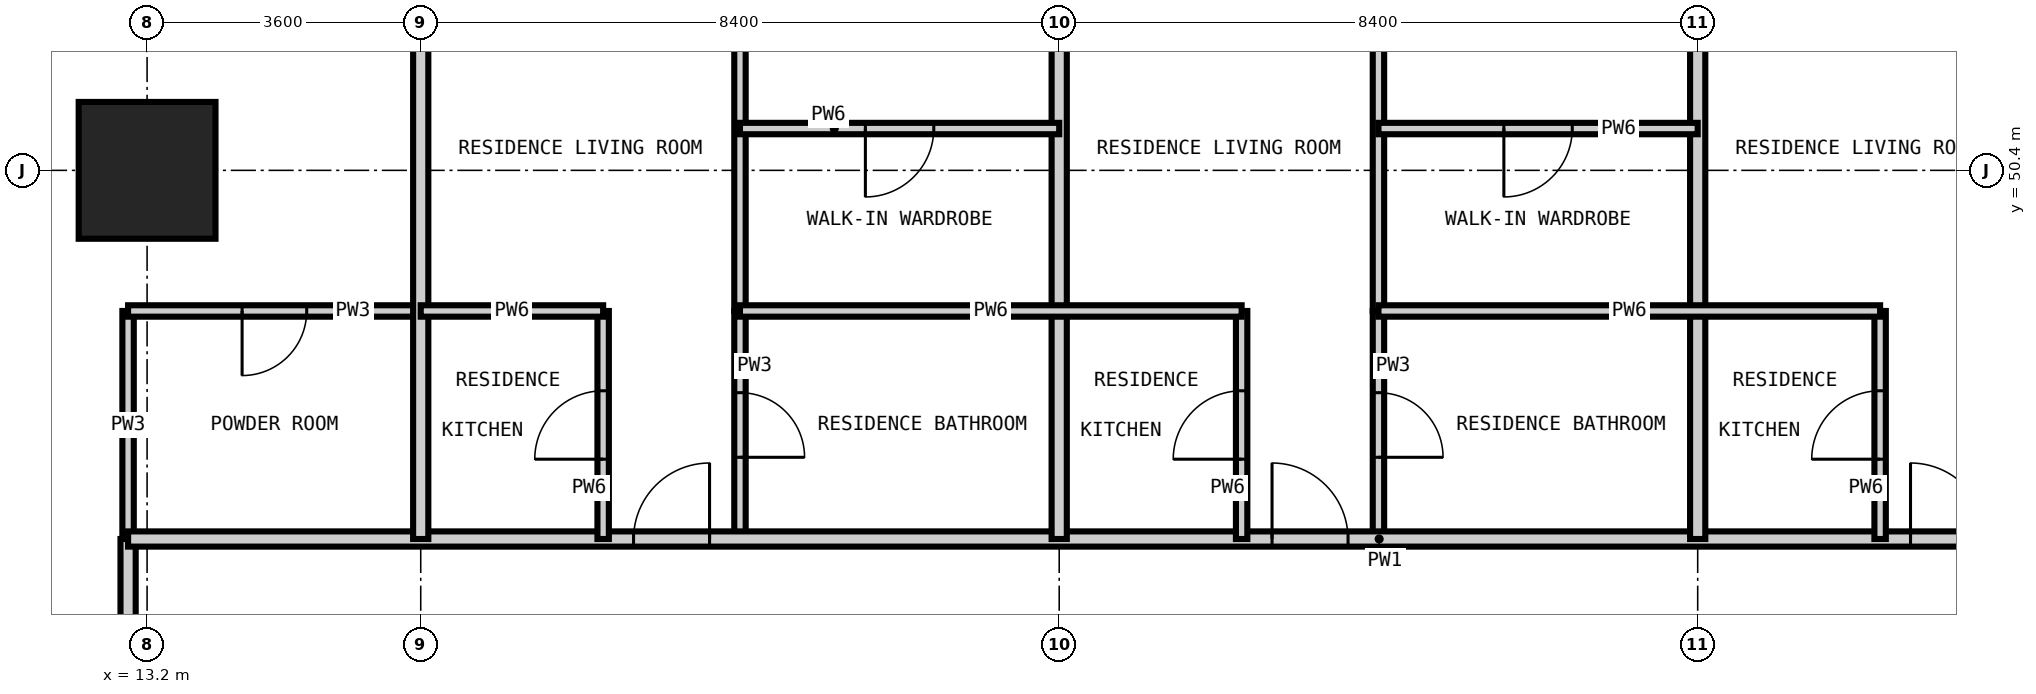
"""IFC4 building model, lengths in metres.
Left out: names, types, materials, properties, quantities, classifications, styles, units other than length and angle.
Written with IfcOpenShell. Run it as: python <this file> out.ifc"""

import sys

from ifc_helpers import new_model, si_unit, direction, frame, frame_2d, origin, origin_2d, place, context, subcontext, project, spatial, rectangle, extrude, element, fill, save


model = new_model("IFC4")
c1 = context("Model", 3, precision=1e-05, world=origin(), true_north=direction((0.0, 1.0)))
c2 = subcontext(c1, "Body", "Model", "MODEL_VIEW")
j1 = project(units=[si_unit("LENGTHUNIT", "METRE"), si_unit("PLANEANGLEUNIT", "RADIAN")], contexts=[c1])
p1 = place(None, origin())
s1 = spatial("IfcSite", under=j1, at=p1, CompositionType="ELEMENT")
p2 = place(p1, origin())
s2 = spatial("IfcBuilding", under=s1, at=p2, CompositionType="ELEMENT")
p3 = place(p2, frame((0.0, 0.0, 45.0)))
s3 = spatial("IfcBuildingStorey", under=s2, at=p3, CompositionType="ELEMENT", Elevation=45.0)
p4 = place(p3, frame((13.2, 50.4, -0.35), z_axis=(0.0, 0.0, 1.0), x_axis=(1.0, 0.0, 0.0)))
e1 = element("IfcColumn", 1, at=p4, inside=s3, PredefinedType="COLUMN", context=c2, shape_type="SweptSolid", body=[
    extrude(rectangle(XDim=1.8, YDim=1.8, at=origin_2d()), origin(), (0.0, 0.0, 1.0), 3.6),
])
p5 = place(p3, frame((12.95, 45.55, 0.0), z_axis=(0.0, 0.0, 1.0), x_axis=(0.0, 1.0, 0.0)))
e2 = element("IfcWall", 2, at=p5, inside=s3, PredefinedType="PARTITIONING", context=c2, shape_type="SweptSolid", body=[
    extrude(rectangle(XDim=3.0, YDim=0.15, at=frame_2d((1.5, 0.0))), origin(), (0.0, 0.0, 1.0), 3.25),
])
p6 = place(p3, frame((21.0, 45.55, 0.0), z_axis=(0.0, 0.0, 1.0), x_axis=(0.0, 1.0, 0.0)))
e3 = element("IfcWall", 3, at=p6, inside=s3, PredefinedType="PARTITIONING", context=c2, shape_type="SweptSolid", body=[
    extrude(rectangle(XDim=3.0, YDim=0.15, at=frame_2d((1.5, 0.0))), origin(), (0.0, 0.0, 1.0), 3.25),
])
p7 = place(p6, frame((1.075, 0.0, 0.0)))
e4 = element("IfcOpeningElement", 4, at=p7, cuts=e3, PredefinedType="OPENING", context=c2, shape_type="SweptSolid", body=[
    extrude(rectangle(XDim=0.85, YDim=2.1, at=frame_2d((0.425, 1.05))), frame((0.0, 0.085, 0.0), z_axis=(0.0, -1.0, 0.0), x_axis=(1.0, 0.0, 0.0)), (0.0, 0.0, 1.0), 0.17),
])
p8 = place(p3, frame((29.4, 45.55, 0.0), z_axis=(0.0, 0.0, 1.0), x_axis=(0.0, 1.0, 0.0)))
e5 = element("IfcWall", 5, at=p8, inside=s3, PredefinedType="PARTITIONING", context=c2, shape_type="SweptSolid", body=[
    extrude(rectangle(XDim=3.0, YDim=0.15, at=frame_2d((1.5, 0.0))), origin(), (0.0, 0.0, 1.0), 3.25),
])
p9 = place(p8, frame((1.075, 0.0, 0.0)))
e6 = element("IfcOpeningElement", 6, at=p9, cuts=e5, PredefinedType="OPENING", context=c2, shape_type="SweptSolid", body=[
    extrude(rectangle(XDim=0.85, YDim=2.1, at=frame_2d((0.425, 1.05))), frame((0.0, 0.085, 0.0), z_axis=(0.0, -1.0, 0.0), x_axis=(1.0, 0.0, 0.0)), (0.0, 0.0, 1.0), 0.17),
])
p10 = place(p3, frame((12.95, 48.55, 0.0), z_axis=(0.0, 0.0, 1.0), x_axis=(1.0, 0.0, 0.0)))
e7 = element("IfcWall", 7, at=p10, inside=s3, PredefinedType="PARTITIONING", context=c2, shape_type="SweptSolid", body=[
    extrude(rectangle(XDim=3.85, YDim=0.15, at=frame_2d((1.925, 0.0))), origin(), (0.0, 0.0, 1.0), 3.25),
])
p11 = place(p10, frame((1.5, 0.0, 0.0)))
e8 = element("IfcOpeningElement", 8, at=p11, cuts=e7, PredefinedType="OPENING", context=c2, shape_type="SweptSolid", body=[
    extrude(rectangle(XDim=0.85, YDim=2.1, at=frame_2d((0.425, 1.05))), frame((0.0, 0.085, 0.0), z_axis=(0.0, -1.0, 0.0), x_axis=(1.0, 0.0, 0.0)), (0.0, 0.0, 1.0), 0.17),
])
p12 = place(p3, frame((12.95, 12.95, 0.0), z_axis=(0.0, 0.0, 1.0), x_axis=(0.0, 1.0, 0.0)))
e9 = element("IfcWall", 9, at=p12, inside=s3, PredefinedType="PARTITIONING", context=c2, shape_type="SweptSolid", body=[
    extrude(rectangle(XDim=32.6, YDim=0.2, at=frame_2d((16.3, 0.0))), origin(), (0.0, 0.0, 1.0), 3.25),
])
p13 = place(p12, frame((8.45, 0.0, 0.0)))
e10 = element("IfcOpeningElement", 10, at=p13, cuts=e9, PredefinedType="OPENING", context=c2, shape_type="SweptSolid", body=[
    extrude(rectangle(XDim=1.0, YDim=2.2, at=frame_2d((0.5, 1.1))), frame((0.0, 0.11, 0.0), z_axis=(0.0, -1.0, 0.0), x_axis=(1.0, 0.0, 0.0)), (0.0, 0.0, 1.0), 0.22),
])
p14 = place(p12, frame((16.7, 0.0, 0.0)))
e11 = element("IfcOpeningElement", 11, at=p14, cuts=e9, PredefinedType="OPENING", context=c2, shape_type="SweptSolid", body=[
    extrude(rectangle(XDim=1.0, YDim=2.2, at=frame_2d((0.5, 1.1))), frame((0.0, 0.11, 0.0), z_axis=(0.0, -1.0, 0.0), x_axis=(1.0, 0.0, 0.0)), (0.0, 0.0, 1.0), 0.22),
])
p15 = place(p12, frame((23.6, 0.0, 0.0)))
e12 = element("IfcOpeningElement", 12, at=p15, cuts=e9, PredefinedType="OPENING", context=c2, shape_type="SweptSolid", body=[
    extrude(rectangle(XDim=1.0, YDim=2.2, at=frame_2d((0.5, 1.1))), frame((0.0, 0.11, 0.0), z_axis=(0.0, -1.0, 0.0), x_axis=(1.0, 0.0, 0.0)), (0.0, 0.0, 1.0), 0.22),
])
p16 = place(p12, frame((25.1, 0.0, 0.0)))
e13 = element("IfcOpeningElement", 13, at=p16, cuts=e9, PredefinedType="OPENING", context=c2, shape_type="SweptSolid", body=[
    extrude(rectangle(XDim=1.0, YDim=2.2, at=frame_2d((0.5, 1.1))), frame((0.0, 0.11, 0.0), z_axis=(0.0, -1.0, 0.0), x_axis=(1.0, 0.0, 0.0)), (0.0, 0.0, 1.0), 0.22),
])
p17 = place(p12, frame((1.425, 0.0, 0.0)))
e14 = element("IfcOpeningElement", 14, at=p17, cuts=e9, PredefinedType="OPENING", context=c2, shape_type="SweptSolid", body=[
    extrude(rectangle(XDim=1.0, YDim=2.2, at=frame_2d((0.5, 1.1))), frame((0.0, 0.11, 0.0), z_axis=(0.0, -1.0, 0.0), x_axis=(1.0, 0.0, 0.0)), (0.0, 0.0, 1.0), 0.22),
])
p18 = place(p12, frame((30.325, 0.0, 0.0)))
e15 = element("IfcOpeningElement", 15, at=p18, cuts=e9, PredefinedType="OPENING", context=c2, shape_type="SweptSolid", body=[
    extrude(rectangle(XDim=1.0, YDim=2.2, at=frame_2d((0.5, 1.1))), frame((0.0, 0.11, 0.0), z_axis=(0.0, -1.0, 0.0), x_axis=(1.0, 0.0, 0.0)), (0.0, 0.0, 1.0), 0.22),
])
p19 = place(p3, frame((12.95, 45.55, 0.0), z_axis=(0.0, 0.0, 1.0), x_axis=(1.0, 0.0, 0.0)))
e16 = element("IfcWall", 16, at=p19, inside=s3, PredefinedType="PARTITIONING", context=c2, shape_type="SweptSolid", body=[
    extrude(rectangle(XDim=32.3, YDim=0.2, at=frame_2d((16.15, 0.0))), origin(), (0.0, 0.0, 1.0), 3.25),
])
p20 = place(p19, frame((6.65, 0.0, 0.0)))
e17 = element("IfcOpeningElement", 17, at=p20, cuts=e16, PredefinedType="OPENING", context=c2, shape_type="SweptSolid", body=[
    extrude(rectangle(XDim=1.0, YDim=2.2, at=frame_2d((0.5, 1.1))), frame((0.0, 0.11, 0.0), z_axis=(0.0, -1.0, 0.0), x_axis=(1.0, 0.0, 0.0)), (0.0, 0.0, 1.0), 0.22),
])
p21 = place(p19, frame((15.05, 0.0, 0.0)))
e18 = element("IfcOpeningElement", 18, at=p21, cuts=e16, PredefinedType="OPENING", context=c2, shape_type="SweptSolid", body=[
    extrude(rectangle(XDim=1.0, YDim=2.2, at=frame_2d((0.5, 1.1))), frame((0.0, 0.11, 0.0), z_axis=(0.0, -1.0, 0.0), x_axis=(1.0, 0.0, 0.0)), (0.0, 0.0, 1.0), 0.22),
])
p22 = place(p19, frame((23.45, 0.0, 0.0)))
e19 = element("IfcOpeningElement", 19, at=p22, cuts=e16, PredefinedType="OPENING", context=c2, shape_type="SweptSolid", body=[
    extrude(rectangle(XDim=1.0, YDim=2.2, at=frame_2d((0.5, 1.1))), frame((0.0, 0.11, 0.0), z_axis=(0.0, -1.0, 0.0), x_axis=(1.0, 0.0, 0.0)), (0.0, 0.0, 1.0), 0.22),
])
for number, where, z_axis, x_axis in (
    (20, (16.8, 45.55, 0.0), (0.0, 0.0, 1.0), (0.0, 1.0, 0.0)),
    (21, (25.2, 45.55, 0.0), (0.0, 0.0, 1.0), (0.0, 1.0, 0.0)),
    (22, (33.6, 45.55, 0.0), (0.0, 0.0, 1.0), (0.0, 1.0, 0.0)),
):
    element("IfcWall", number, at=place(p3, frame(where, z_axis=z_axis, x_axis=x_axis)), inside=s3, PredefinedType="PARTITIONING", context=c2, shape_type="SweptSolid", body=[
        extrude(rectangle(XDim=13.258, YDim=0.2, at=frame_2d((6.629, 0.0))), origin(), (0.0, 0.0, 1.0), 3.25),
    ])
p23 = place(p3, frame((19.2, 45.55, 0.0), z_axis=(0.0, 0.0, 1.0), x_axis=(0.0, 1.0, 0.0)))
e23 = element("IfcWall", 23, at=p23, inside=s3, PredefinedType="PARTITIONING", context=c2, shape_type="SweptSolid", body=[
    extrude(rectangle(XDim=3.0, YDim=0.15, at=frame_2d((1.5, 0.0))), origin(), (0.0, 0.0, 1.0), 3.25),
])
p24 = place(p23, frame((1.05, 0.0, 0.0)))
e24 = element("IfcOpeningElement", 24, at=p24, cuts=e23, PredefinedType="OPENING", context=c2, shape_type="SweptSolid", body=[
    extrude(rectangle(XDim=0.9, YDim=2.1, at=frame_2d((0.45, 1.05))), frame((0.0, 0.085, 0.0), z_axis=(0.0, -1.0, 0.0), x_axis=(1.0, 0.0, 0.0)), (0.0, 0.0, 1.0), 0.17),
])
p25 = place(p3, frame((21.0, 48.55, 0.0), z_axis=(0.0, 0.0, 1.0), x_axis=(0.0, 1.0, 0.0)))
e25 = element("IfcWall", 25, at=p25, inside=s3, PredefinedType="PARTITIONING", context=c2, shape_type="SweptSolid", body=[
    extrude(rectangle(XDim=10.258, YDim=0.15, at=frame_2d((5.129, 0.0))), origin(), (0.0, 0.0, 1.0), 3.25),
])
p26 = place(p25, frame((5.875, 0.0, 0.0)))
e26 = element("IfcOpeningElement", 26, at=p26, cuts=e25, PredefinedType="OPENING", context=c2, shape_type="SweptSolid", body=[
    extrude(rectangle(XDim=0.9, YDim=2.1, at=frame_2d((0.45, 1.05))), frame((0.0, 0.085, 0.0), z_axis=(0.0, -1.0, 0.0), x_axis=(1.0, 0.0, 0.0)), (0.0, 0.0, 1.0), 0.17),
])
p27 = place(p3, frame((27.6, 45.55, 0.0), z_axis=(0.0, 0.0, 1.0), x_axis=(0.0, 1.0, 0.0)))
e27 = element("IfcWall", 27, at=p27, inside=s3, PredefinedType="PARTITIONING", context=c2, shape_type="SweptSolid", body=[
    extrude(rectangle(XDim=3.0, YDim=0.15, at=frame_2d((1.5, 0.0))), origin(), (0.0, 0.0, 1.0), 3.25),
])
p28 = place(p27, frame((1.05, 0.0, 0.0)))
e28 = element("IfcOpeningElement", 28, at=p28, cuts=e27, PredefinedType="OPENING", context=c2, shape_type="SweptSolid", body=[
    extrude(rectangle(XDim=0.9, YDim=2.1, at=frame_2d((0.45, 1.05))), frame((0.0, 0.085, 0.0), z_axis=(0.0, -1.0, 0.0), x_axis=(1.0, 0.0, 0.0)), (0.0, 0.0, 1.0), 0.17),
])
p29 = place(p3, frame((29.4, 48.55, 0.0), z_axis=(0.0, 0.0, 1.0), x_axis=(0.0, 1.0, 0.0)))
e29 = element("IfcWall", 29, at=p29, inside=s3, PredefinedType="PARTITIONING", context=c2, shape_type="SweptSolid", body=[
    extrude(rectangle(XDim=10.258, YDim=0.15, at=frame_2d((5.129, 0.0))), origin(), (0.0, 0.0, 1.0), 3.25),
])
p30 = place(p29, frame((5.875, 0.0, 0.0)))
e30 = element("IfcOpeningElement", 30, at=p30, cuts=e29, PredefinedType="OPENING", context=c2, shape_type="SweptSolid", body=[
    extrude(rectangle(XDim=0.9, YDim=2.1, at=frame_2d((0.45, 1.05))), frame((0.0, 0.085, 0.0), z_axis=(0.0, -1.0, 0.0), x_axis=(1.0, 0.0, 0.0)), (0.0, 0.0, 1.0), 0.17),
])
p31 = place(p3, frame((36.0, 45.55, 0.0), z_axis=(0.0, 0.0, 1.0), x_axis=(0.0, 1.0, 0.0)))
e31 = element("IfcWall", 31, at=p31, inside=s3, PredefinedType="PARTITIONING", context=c2, shape_type="SweptSolid", body=[
    extrude(rectangle(XDim=3.0, YDim=0.15, at=frame_2d((1.5, 0.0))), origin(), (0.0, 0.0, 1.0), 3.25),
])
p32 = place(p31, frame((1.05, 0.0, 0.0)))
e32 = element("IfcOpeningElement", 32, at=p32, cuts=e31, PredefinedType="OPENING", context=c2, shape_type="SweptSolid", body=[
    extrude(rectangle(XDim=0.9, YDim=2.1, at=frame_2d((0.45, 1.05))), frame((0.0, 0.085, 0.0), z_axis=(0.0, -1.0, 0.0), x_axis=(1.0, 0.0, 0.0)), (0.0, 0.0, 1.0), 0.17),
])
p33 = place(p3, frame((16.8, 48.55, 0.0), z_axis=(0.0, 0.0, 1.0), x_axis=(1.0, 0.0, 0.0)))
e33 = element("IfcWall", 33, at=p33, inside=s3, PredefinedType="PARTITIONING", context=c2, shape_type="SweptSolid", body=[
    extrude(rectangle(XDim=2.4, YDim=0.15, at=frame_2d((1.2, 0.0))), origin(), (0.0, 0.0, 1.0), 3.25),
])
for number, where, z_axis, x_axis in (
    (34, (21.0, 48.55, 0.0), (0.0, 0.0, 1.0), (1.0, 0.0, 0.0)),
    (35, (29.4, 48.55, 0.0), (0.0, 0.0, 1.0), (1.0, 0.0, 0.0)),
):
    element("IfcWall", number, at=place(p3, frame(where, z_axis=z_axis, x_axis=x_axis)), inside=s3, PredefinedType="PARTITIONING", context=c2, shape_type="SweptSolid", body=[
        extrude(rectangle(XDim=6.6, YDim=0.15, at=frame_2d((3.3, 0.0))), origin(), (0.0, 0.0, 1.0), 3.25),
    ])
p34 = place(p3, frame((21.0, 50.95, 0.0), z_axis=(0.0, 0.0, 1.0), x_axis=(1.0, 0.0, 0.0)))
e36 = element("IfcWall", 36, at=p34, inside=s3, PredefinedType="PARTITIONING", context=c2, shape_type="SweptSolid", body=[
    extrude(rectangle(XDim=4.2, YDim=0.15, at=frame_2d((2.1, 0.0))), origin(), (0.0, 0.0, 1.0), 3.25),
])
p35 = place(p34, frame((1.65, 0.0, 0.0)))
e37 = element("IfcOpeningElement", 37, at=p35, cuts=e36, PredefinedType="OPENING", context=c2, shape_type="SweptSolid", body=[
    extrude(rectangle(XDim=0.9, YDim=2.1, at=frame_2d((0.45, 1.05))), frame((0.0, 0.085, 0.0), z_axis=(0.0, -1.0, 0.0), x_axis=(1.0, 0.0, 0.0)), (0.0, 0.0, 1.0), 0.17),
])
p36 = place(p3, frame((29.4, 50.95, 0.0), z_axis=(0.0, 0.0, 1.0), x_axis=(1.0, 0.0, 0.0)))
e38 = element("IfcWall", 38, at=p36, inside=s3, PredefinedType="PARTITIONING", context=c2, shape_type="SweptSolid", body=[
    extrude(rectangle(XDim=4.2, YDim=0.15, at=frame_2d((2.1, 0.0))), origin(), (0.0, 0.0, 1.0), 3.25),
])
p37 = place(p36, frame((1.65, 0.0, 0.0)))
e39 = element("IfcOpeningElement", 39, at=p37, cuts=e38, PredefinedType="OPENING", context=c2, shape_type="SweptSolid", body=[
    extrude(rectangle(XDim=0.9, YDim=2.1, at=frame_2d((0.45, 1.05))), frame((0.0, 0.085, 0.0), z_axis=(0.0, -1.0, 0.0), x_axis=(1.0, 0.0, 0.0)), (0.0, 0.0, 1.0), 0.17),
])
p38 = place(p20, origin())
e40 = element("IfcDoor", 40, at=p38, inside=s3, OperationType="SINGLE_SWING_RIGHT", PredefinedType="DOOR", context=c2, shape_type="SweptSolid", body=[
    extrude(rectangle(XDim=1.0, YDim=2.2, at=frame_2d((0.5, 1.1))), frame((0.0, 0.025, 0.0), z_axis=(0.0, -1.0, 0.0), x_axis=(1.0, 0.0, 0.0)), (0.0, 0.0, 1.0), 0.05),
])
fill(e17, e40)
p39 = place(p24, origin())
e41 = element("IfcDoor", 41, at=p39, inside=s3, OperationType="SINGLE_SWING_LEFT", PredefinedType="DOOR", context=c2, shape_type="SweptSolid", body=[
    extrude(rectangle(XDim=0.9, YDim=2.1, at=frame_2d((0.45, 1.05))), frame((0.0, 0.025, 0.0), z_axis=(0.0, -1.0, 0.0), x_axis=(1.0, 0.0, 0.0)), (0.0, 0.0, 1.0), 0.05),
])
fill(e24, e41)
p40 = place(p7, frame((0.85, 0.0, 0.0), z_axis=(0.0, 0.0, 1.0), x_axis=(-1.0, 0.0, 0.0)))
e42 = element("IfcDoor", 42, at=p40, inside=s3, OperationType="SINGLE_SWING_RIGHT", PredefinedType="DOOR", context=c2, shape_type="SweptSolid", body=[
    extrude(rectangle(XDim=0.85, YDim=2.1, at=frame_2d((0.425, 1.05))), frame((0.0, 0.025, 0.0), z_axis=(0.0, -1.0, 0.0), x_axis=(1.0, 0.0, 0.0)), (0.0, 0.0, 1.0), 0.05),
])
fill(e4, e42)
p41 = place(p35, frame((0.9, 0.0, 0.0), z_axis=(0.0, 0.0, 1.0), x_axis=(-1.0, 0.0, 0.0)))
e43 = element("IfcDoor", 43, at=p41, inside=s3, OperationType="SINGLE_SWING_RIGHT", PredefinedType="DOOR", context=c2, shape_type="SweptSolid", body=[
    extrude(rectangle(XDim=0.9, YDim=2.1, at=frame_2d((0.45, 1.05))), frame((0.0, 0.025, 0.0), z_axis=(0.0, -1.0, 0.0), x_axis=(1.0, 0.0, 0.0)), (0.0, 0.0, 1.0), 0.05),
])
fill(e37, e43)
p42 = place(p21, origin())
e44 = element("IfcDoor", 44, at=p42, inside=s3, OperationType="SINGLE_SWING_LEFT", PredefinedType="DOOR", context=c2, shape_type="SweptSolid", body=[
    extrude(rectangle(XDim=1.0, YDim=2.2, at=frame_2d((0.5, 1.1))), frame((0.0, 0.025, 0.0), z_axis=(0.0, -1.0, 0.0), x_axis=(1.0, 0.0, 0.0)), (0.0, 0.0, 1.0), 0.05),
])
fill(e18, e44)
p43 = place(p28, origin())
e45 = element("IfcDoor", 45, at=p43, inside=s3, OperationType="SINGLE_SWING_LEFT", PredefinedType="DOOR", context=c2, shape_type="SweptSolid", body=[
    extrude(rectangle(XDim=0.9, YDim=2.1, at=frame_2d((0.45, 1.05))), frame((0.0, 0.025, 0.0), z_axis=(0.0, -1.0, 0.0), x_axis=(1.0, 0.0, 0.0)), (0.0, 0.0, 1.0), 0.05),
])
fill(e28, e45)
p44 = place(p9, frame((0.85, 0.0, 0.0), z_axis=(0.0, 0.0, 1.0), x_axis=(-1.0, 0.0, 0.0)))
e46 = element("IfcDoor", 46, at=p44, inside=s3, OperationType="SINGLE_SWING_RIGHT", PredefinedType="DOOR", context=c2, shape_type="SweptSolid", body=[
    extrude(rectangle(XDim=0.85, YDim=2.1, at=frame_2d((0.425, 1.05))), frame((0.0, 0.025, 0.0), z_axis=(0.0, -1.0, 0.0), x_axis=(1.0, 0.0, 0.0)), (0.0, 0.0, 1.0), 0.05),
])
fill(e6, e46)
p45 = place(p37, frame((0.9, 0.0, 0.0), z_axis=(0.0, 0.0, 1.0), x_axis=(-1.0, 0.0, 0.0)))
e47 = element("IfcDoor", 47, at=p45, inside=s3, OperationType="SINGLE_SWING_RIGHT", PredefinedType="DOOR", context=c2, shape_type="SweptSolid", body=[
    extrude(rectangle(XDim=0.9, YDim=2.1, at=frame_2d((0.45, 1.05))), frame((0.0, 0.025, 0.0), z_axis=(0.0, -1.0, 0.0), x_axis=(1.0, 0.0, 0.0)), (0.0, 0.0, 1.0), 0.05),
])
fill(e39, e47)
p46 = place(p22, origin())
e48 = element("IfcDoor", 48, at=p46, inside=s3, OperationType="SINGLE_SWING_LEFT", PredefinedType="DOOR", context=c2, shape_type="SweptSolid", body=[
    extrude(rectangle(XDim=1.0, YDim=2.2, at=frame_2d((0.5, 1.1))), frame((0.0, 0.025, 0.0), z_axis=(0.0, -1.0, 0.0), x_axis=(1.0, 0.0, 0.0)), (0.0, 0.0, 1.0), 0.05),
])
fill(e19, e48)
p47 = place(p32, origin())
e49 = element("IfcDoor", 49, at=p47, inside=s3, OperationType="SINGLE_SWING_LEFT", PredefinedType="DOOR", context=c2, shape_type="SweptSolid", body=[
    extrude(rectangle(XDim=0.9, YDim=2.1, at=frame_2d((0.45, 1.05))), frame((0.0, 0.025, 0.0), z_axis=(0.0, -1.0, 0.0), x_axis=(1.0, 0.0, 0.0)), (0.0, 0.0, 1.0), 0.05),
])
fill(e32, e49)
p48 = place(p11, frame((0.85, 0.0, 0.0), z_axis=(0.0, 0.0, 1.0), x_axis=(-1.0, 0.0, 0.0)))
e50 = element("IfcDoor", 50, at=p48, inside=s3, OperationType="SINGLE_SWING_RIGHT", PredefinedType="DOOR", context=c2, shape_type="SweptSolid", body=[
    extrude(rectangle(XDim=0.85, YDim=2.1, at=frame_2d((0.425, 1.05))), frame((0.0, 0.025, 0.0), z_axis=(0.0, -1.0, 0.0), x_axis=(1.0, 0.0, 0.0)), (0.0, 0.0, 1.0), 0.05),
])
fill(e8, e50)
save(model, sys.argv[1])
